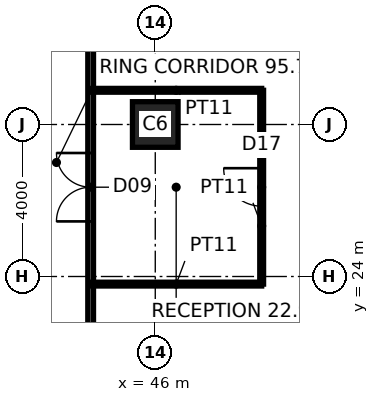
"""IFC4 building model, lengths in metres.
Left out: names, types, materials, properties, quantities, classifications, styles, units other than length and angle.
Written with IfcOpenShell. Run it as: python <this file> out.ifc"""

import sys

from ifc_helpers import new_model, si_unit, direction, frame, frame_2d, origin, origin_2d, place, context, subcontext, project, spatial, rectangle, hollow_rectangle, extrude, element, fill, save


model = new_model("IFC4")
c1 = context("Model", 3, precision=1e-05, world=origin(), true_north=direction((0.0, 1.0)))
c2 = subcontext(c1, "Body", "Model", "MODEL_VIEW")
j1 = project(units=[si_unit("LENGTHUNIT", "METRE"), si_unit("PLANEANGLEUNIT", "RADIAN")], contexts=[c1])
p1 = place(None, origin())
s1 = spatial("IfcSite", under=j1, at=p1, CompositionType="ELEMENT")
p2 = place(p1, origin())
s2 = spatial("IfcBuilding", under=s1, at=p2, CompositionType="ELEMENT")
p3 = place(p2, frame((0.0, 0.0, 39.0)))
s3 = spatial("IfcBuildingStorey", under=s2, at=p3, CompositionType="ELEMENT", Elevation=39.0)
p4 = place(p3, frame((46.0, 28.0, 0.0), z_axis=(0.0, 0.0, 1.0), x_axis=(1.0, 0.0, 0.0)))
e1 = element("IfcColumn", 1, at=p4, inside=s3, PredefinedType="COLUMN", context=c2, shape_type="SweptSolid", body=[
    extrude(hollow_rectangle(XDim=1.2, YDim=1.2, WallThickness=0.125, at=origin_2d()), origin(), (0.0, 0.0, 1.0), 4.0),
])
p5 = place(p3, frame((44.3, 14.625, 0.0), z_axis=(0.0, 0.0, 1.0), x_axis=(0.0, 1.0, 0.0)))
e2 = element("IfcWall", 2, at=p5, inside=s3, PredefinedType="PARTITIONING", context=c2, shape_type="SweptSolid", body=[
    extrude(rectangle(XDim=24.15, YDim=0.15, at=frame_2d((12.075, 0.0))), origin(), (0.0, 0.0, 1.0), 3.85),
])
p6 = place(p5, frame((10.825, 0.0, 0.0)))
e3 = element("IfcOpeningElement", 3, at=p6, cuts=e2, PredefinedType="OPENING", context=c2, shape_type="SweptSolid", body=[
    extrude(rectangle(XDim=1.8, YDim=2.4, at=frame_2d((0.9, 1.2))), frame((0.0, 0.085, 0.0), z_axis=(0.0, -1.0, 0.0), x_axis=(1.0, 0.0, 0.0)), (0.0, 0.0, 1.0), 0.17),
])
p7 = place(p3, frame((44.3, 23.8, 0.0), z_axis=(0.0, 0.0, 1.0), x_axis=(1.0, 0.0, 0.0)))
e4 = element("IfcWall", 4, at=p7, inside=s3, PredefinedType="PARTITIONING", context=c2, shape_type="SweptSolid", body=[
    extrude(rectangle(XDim=4.5, YDim=0.1, at=frame_2d((2.25, 0.0))), origin(), (0.0, 0.0, 1.0), 2.65),
])
p8 = place(p3, frame((48.8, 23.8, 0.0), z_axis=(0.0, 0.0, 1.0), x_axis=(0.0, 1.0, 0.0)))
e5 = element("IfcWall", 5, at=p8, inside=s3, PredefinedType="PARTITIONING", context=c2, shape_type="SweptSolid", body=[
    extrude(rectangle(XDim=5.1, YDim=0.1, at=frame_2d((2.55, 0.0))), origin(), (0.0, 0.0, 1.0), 3.85),
])
p9 = place(p8, frame((2.05, 0.0, 0.0)))
e6 = element("IfcOpeningElement", 6, at=p9, cuts=e5, PredefinedType="OPENING", context=c2, shape_type="SweptSolid", body=[
    extrude(rectangle(XDim=1.0, YDim=2.2, at=frame_2d((0.5, 1.1))), frame((0.0, 0.06, 0.0), z_axis=(0.0, -1.0, 0.0), x_axis=(1.0, 0.0, 0.0)), (0.0, 0.0, 1.0), 0.12),
])
p10 = place(p3, frame((48.8, 28.9, 0.0), z_axis=(0.0, 0.0, 1.0), x_axis=(-1.0, 0.0, 0.0)))
e7 = element("IfcWall", 7, at=p10, inside=s3, PredefinedType="PARTITIONING", context=c2, shape_type="SweptSolid", body=[
    extrude(rectangle(XDim=4.5, YDim=0.1, at=frame_2d((2.25, 0.0))), origin(), (0.0, 0.0, 1.0), 3.85),
])
p11 = place(p6, origin())
e8 = element("IfcDoor", 8, at=p11, inside=s3, OperationType="DOUBLE_DOOR_DOUBLE_SWING", PredefinedType="DOOR", context=c2, shape_type="SweptSolid", body=[
    extrude(rectangle(XDim=1.8, YDim=2.4, at=frame_2d((0.9, 1.2))), frame((0.0, 0.025, 0.0), z_axis=(0.0, -1.0, 0.0), x_axis=(1.0, 0.0, 0.0)), (0.0, 0.0, 1.0), 0.05),
])
fill(e3, e8)
p12 = place(p9, origin())
e9 = element("IfcDoor", 9, at=p12, inside=s3, OperationType="SINGLE_SWING_RIGHT", PredefinedType="DOOR", context=c2, shape_type="SweptSolid", body=[
    extrude(rectangle(XDim=1.0, YDim=2.2, at=frame_2d((0.5, 1.1))), frame((0.0, 0.025, 0.0), z_axis=(0.0, -1.0, 0.0), x_axis=(1.0, 0.0, 0.0)), (0.0, 0.0, 1.0), 0.05),
])
fill(e6, e9)
save(model, sys.argv[1])
